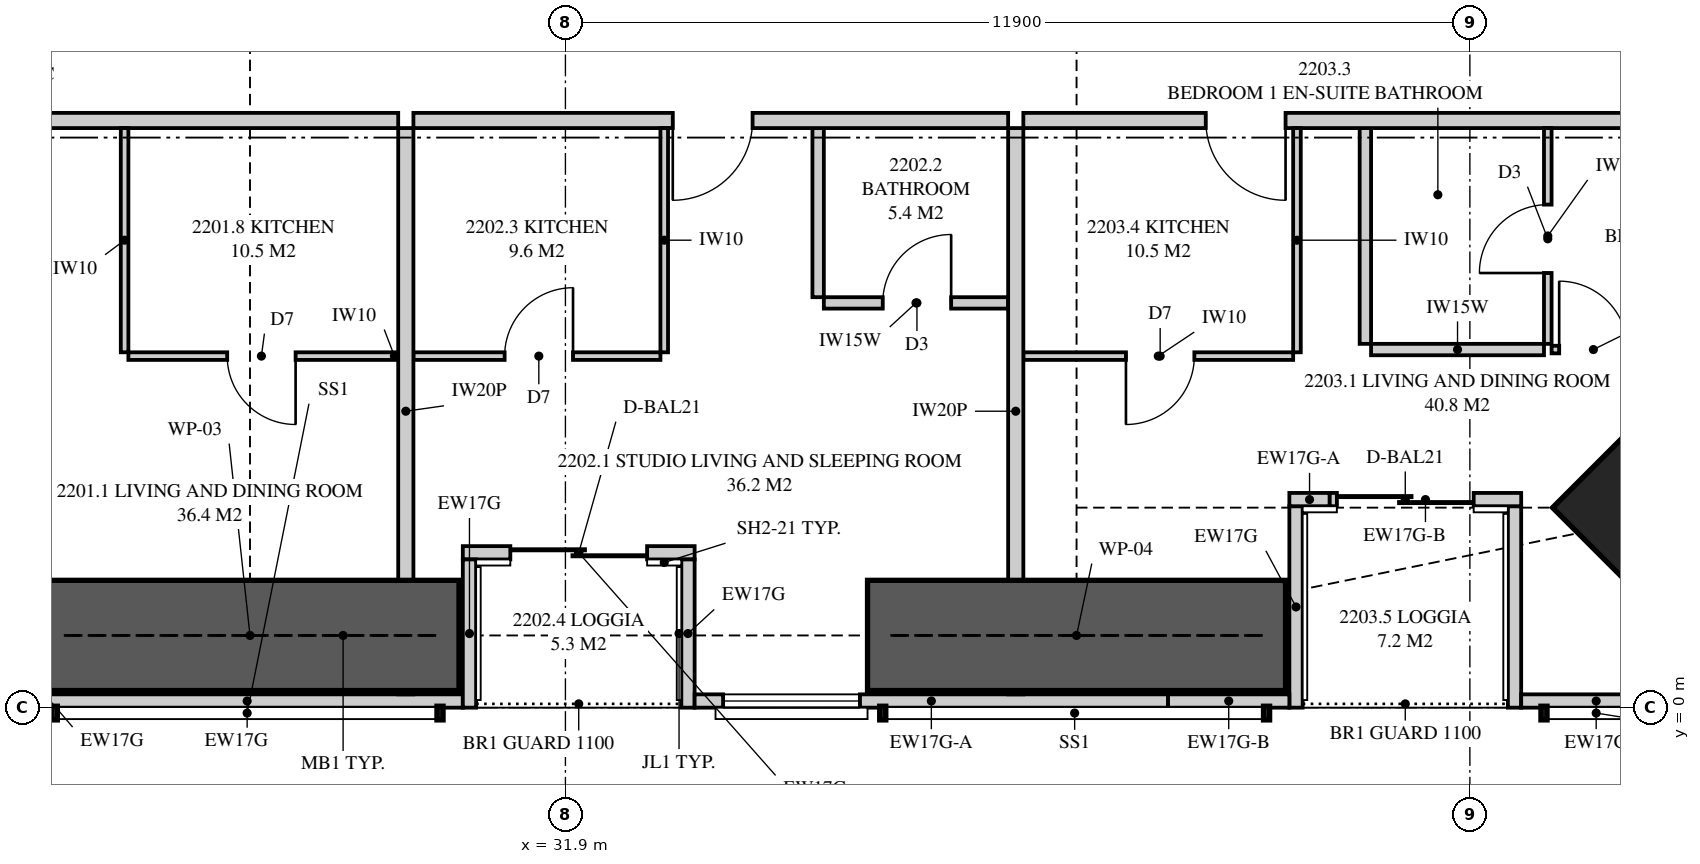
"""IFC4 building model, lengths in metres.
Left out: names, types, materials, properties, quantities, classifications, styles, units other than length and angle.
Written with IfcOpenShell. Run it as: python <this file> out.ifc"""

import sys

from ifc_helpers import new_model, si_unit, direction, frame, frame_2d, origin, origin_2d, place, context, subcontext, project, spatial, polyline, rectangle, hollow_rectangle, outline, extrude, element, fill, save


model = new_model("IFC4")
c1 = context("Model", 3, precision=1e-05, world=origin(), true_north=direction((0.0, 1.0)))
c2 = subcontext(c1, "Body", "Model", "MODEL_VIEW")
j1 = project(units=[si_unit("LENGTHUNIT", "METRE"), si_unit("PLANEANGLEUNIT", "RADIAN")], contexts=[c1])
p1 = place(None, origin())
s1 = spatial("IfcSite", under=j1, at=p1, CompositionType="ELEMENT")
p2 = place(p1, origin())
s2 = spatial("IfcBuilding", under=s1, at=p2, CompositionType="ELEMENT")
p3 = place(p2, frame((0.0, 0.0, 84.75)))
s3 = spatial("IfcBuildingStorey", under=s2, at=p3, CompositionType="ELEMENT", Elevation=84.75)
p4 = place(p3, frame((46.869, 2.631, 0.0), z_axis=(0.0, 0.0, 1.0), x_axis=(-0.707106781187, 0.707106781187, 0.0)))
e1 = element("IfcColumn", 1, at=p4, inside=s3, PredefinedType="COLUMN", context=c2, shape_type="SweptSolid", body=[
    extrude(hollow_rectangle(XDim=2.8, YDim=2.8, WallThickness=0.25, at=origin_2d()), origin(), (0.0, 0.0, 1.0), 3.35),
])
p5 = place(p3, frame((24.875, 0.087, 0.0), z_axis=(0.0, 0.0, 1.0), x_axis=(1.0, 0.0, 0.0)))
e2 = element("IfcWall", 2, at=p5, inside=s3, PredefinedType="SOLIDWALL", context=c2, shape_type="SweptSolid", body=[
    extrude(rectangle(XDim=5.675, YDim=0.175, at=frame_2d((2.837, 0.0))), origin(), (0.0, 0.0, 1.0), 2.15),
])
p6 = place(p3, frame((33.6, 0.087, 0.0), z_axis=(0.0, 0.0, 1.0), x_axis=(1.0, 0.0, 0.0)))
e3 = element("IfcWall", 3, at=p6, inside=s3, PredefinedType="SOLIDWALL", context=c2, shape_type="SweptSolid", body=[
    extrude(rectangle(XDim=6.229, YDim=0.175, at=frame_2d((3.115, 0.0))), origin(), (0.0, 0.0, 1.0), 2.15),
])
p7 = place(p6, frame((0.375, 0.0, 0.4)))
e4 = element("IfcOpeningElement", 4, at=p7, cuts=e3, PredefinedType="OPENING", context=c2, shape_type="SweptSolid", body=[
    extrude(rectangle(XDim=1.8, YDim=1.7, at=frame_2d((0.9, 0.85))), frame((0.0, 0.097, 0.0), z_axis=(0.0, -1.0, 0.0), x_axis=(1.0, 0.0, 0.0)), (0.0, 0.0, 1.0), 0.195),
])
p8 = place(p3, frame((39.829, 0.087, 0.0), z_axis=(0.0, 0.0, 1.0), x_axis=(1.0, 0.0, 0.0)))
e5 = element("IfcWall", 5, at=p8, inside=s3, PredefinedType="SOLIDWALL", context=c2, shape_type="SweptSolid", body=[
    extrude(rectangle(XDim=1.596, YDim=0.175, at=frame_2d((0.798, 0.0))), origin(), (0.0, 0.0, 1.0), 3.11),
])
p9 = place(p3, frame((44.475, 0.087, 0.0), z_axis=(0.0, 0.0, 1.0), x_axis=(1.0, 0.0, 0.0)))
e6 = element("IfcWall", 6, at=p9, inside=s3, PredefinedType="SOLIDWALL", context=c2, shape_type="SweptSolid", body=[
    extrude(rectangle(XDim=1.974, YDim=0.175, at=frame_2d((0.987, 0.0))), origin(), (0.0, 0.0, 1.0), 3.11),
])
p10 = place(p3, frame((30.55, 2.038, 0.0), z_axis=(0.0, 0.0, 1.0), x_axis=(1.0, 0.0, 0.0)))
e7 = element("IfcWall", 7, at=p10, inside=s3, PredefinedType="SOLIDWALL", context=c2, shape_type="SweptSolid", body=[
    extrude(rectangle(XDim=3.05, YDim=0.175, at=frame_2d((1.525, 0.0))), origin(), (0.0, 0.0, 1.0), 2.15),
])
p11 = place(p10, frame((0.625, 0.0, 0.0)))
e8 = element("IfcOpeningElement", 8, at=p11, cuts=e7, PredefinedType="OPENING", context=c2, shape_type="SweptSolid", body=[
    extrude(rectangle(XDim=1.8, YDim=2.1, at=frame_2d((0.9, 1.05))), frame((0.0, 0.097, 0.0), z_axis=(0.0, -1.0, 0.0), x_axis=(1.0, 0.0, 0.0)), (0.0, 0.0, 1.0), 0.195),
])
for number, where, z_axis, x_axis in (
    (9, (30.637, 0.0, 0.0), (0.0, 0.0, 1.0), (0.0, 1.0, 0.0)),
    (10, (33.512, 0.0, 0.0), (0.0, 0.0, 1.0), (0.0, 1.0, 0.0)),
):
    element("IfcWall", number, at=place(p3, frame(where, z_axis=z_axis, x_axis=x_axis)), inside=s3, PredefinedType="SOLIDWALL", context=c2, shape_type="SweptSolid", body=[
        extrude(rectangle(XDim=1.95, YDim=0.175, at=frame_2d((0.975, 0.0))), origin(), (0.0, 0.0, 1.0), 2.15),
    ])
p12 = place(p3, frame((41.425, 2.738, 0.0), z_axis=(0.0, 0.0, 1.0), x_axis=(1.0, 0.0, 0.0)))
e11 = element("IfcWall", 11, at=p12, inside=s3, PredefinedType="SOLIDWALL", context=c2, shape_type="SweptSolid", body=[
    extrude(rectangle(XDim=0.531, YDim=0.175, at=frame_2d((0.266, 0.0))), origin(), (0.0, 0.0, 1.0), 2.51),
])
p13 = place(p3, frame((41.956, 2.738, 0.0), z_axis=(0.0, 0.0, 1.0), x_axis=(1.0, 0.0, 0.0)))
e12 = element("IfcWall", 12, at=p13, inside=s3, PredefinedType="SOLIDWALL", context=c2, shape_type="SweptSolid", body=[
    extrude(rectangle(XDim=2.519, YDim=0.175, at=frame_2d((1.26, 0.0))), origin(), (0.0, 0.0, 1.0), 2.15),
])
p14 = place(p13, frame((0.094, 0.0, 0.0)))
e13 = element("IfcOpeningElement", 13, at=p14, cuts=e12, PredefinedType="OPENING", context=c2, shape_type="SweptSolid", body=[
    extrude(rectangle(XDim=1.8, YDim=2.1, at=frame_2d((0.9, 1.05))), frame((0.0, 0.097, 0.0), z_axis=(0.0, -1.0, 0.0), x_axis=(1.0, 0.0, 0.0)), (0.0, 0.0, 1.0), 0.195),
])
p15 = place(p3, frame((41.512, 0.0, 0.0), z_axis=(0.0, 0.0, 1.0), x_axis=(0.0, 1.0, 0.0)))
e14 = element("IfcWall", 14, at=p15, inside=s3, PredefinedType="SOLIDWALL", context=c2, shape_type="SweptSolid", body=[
    extrude(outline(polyline([(0.0, 0.0), (2.65, 0.0), (2.65, 2.51), (2.577, 2.51), (2.577, 2.15), (0.5, 2.15), (0.5, 3.11), (0.0, 3.11), (0.0, 0.0)])), frame((0.0, 0.087, 0.0), z_axis=(0.0, -1.0, 0.0), x_axis=(1.0, 0.0, 0.0)), (0.0, 0.0, 1.0), 0.175),
])
p16 = place(p3, frame((44.387, 0.0, 0.0), z_axis=(0.0, 0.0, 1.0), x_axis=(0.0, 1.0, 0.0)))
e15 = element("IfcWall", 15, at=p16, inside=s3, PredefinedType="SOLIDWALL", context=c2, shape_type="SweptSolid", body=[
    extrude(outline(polyline([(0.0, 0.0), (2.65, 0.0), (2.65, 2.15), (1.087, 2.15), (1.087, 3.11), (0.0, 3.11), (0.0, 0.0)])), frame((0.0, 0.087, 0.0), z_axis=(0.0, -1.0, 0.0), x_axis=(1.0, 0.0, 0.0)), (0.0, 0.0, 1.0), 0.175),
])
p17 = place(p3, frame((29.8, 0.175, 0.0), z_axis=(0.0, 0.0, 1.0), x_axis=(0.0, 1.0, 0.0)))
e16 = element("IfcWall", 16, at=p17, inside=s3, PredefinedType="PARTITIONING", context=c2, shape_type="SweptSolid", body=[
    extrude(outline(polyline([(0.0, 0.0), (7.45, 0.0), (7.45, 3.11), (1.885, 3.11), (1.885, 2.15), (1.021, 2.15), (1.021, 1.986), (0.529, 1.986), (0.529, 2.15), (0.0, 2.15), (0.0, 0.0)])), frame((0.0, 0.1, 0.0), z_axis=(0.0, -1.0, 0.0), x_axis=(1.0, 0.0, 0.0)), (0.0, 0.0, 1.0), 0.2),
])
p18 = place(p3, frame((26.15, 4.625, 0.0), z_axis=(0.0, 0.0, 1.0), x_axis=(1.0, 0.0, 0.0)))
e17 = element("IfcWall", 17, at=p18, inside=s3, PredefinedType="PARTITIONING", context=c2, shape_type="SweptSolid", body=[
    extrude(outline(polyline([(0.0, 0.0), (3.55, 0.0), (3.55, 3.11), (1.896, 3.11), (1.896, 2.531), (1.304, 2.531), (1.304, 3.11), (0.0, 3.11), (0.0, 0.0)])), frame((0.0, 0.05, 0.0), z_axis=(0.0, -1.0, 0.0), x_axis=(1.0, 0.0, 0.0)), (0.0, 0.0, 1.0), 0.1),
])
p19 = place(p18, frame((1.3, 0.0, 0.0)))
e18 = element("IfcOpeningElement", 18, at=p19, cuts=e17, PredefinedType="OPENING", context=c2, shape_type="SweptSolid", body=[
    extrude(rectangle(XDim=0.9, YDim=2.1, at=frame_2d((0.45, 1.05))), frame((0.0, 0.06, 0.0), z_axis=(0.0, -1.0, 0.0), x_axis=(1.0, 0.0, 0.0)), (0.0, 0.0, 1.0), 0.12),
])
p20 = place(p3, frame((26.1, 4.675, 0.0), z_axis=(0.0, 0.0, 1.0), x_axis=(0.0, 1.0, 0.0)))
e19 = element("IfcWall", 19, at=p20, inside=s3, PredefinedType="PARTITIONING", context=c2, shape_type="SweptSolid", body=[
    extrude(rectangle(XDim=2.95, YDim=0.1, at=frame_2d((1.475, 0.0))), origin(), (0.0, 0.0, 1.0), 3.11),
])
p21 = place(p3, frame((37.825, 0.175, 0.0), z_axis=(0.0, 0.0, 1.0), x_axis=(0.0, 1.0, 0.0)))
e20 = element("IfcWall", 20, at=p21, inside=s3, PredefinedType="PARTITIONING", context=c2, shape_type="SweptSolid", body=[
    extrude(outline(polyline([(1.885, 2.15), (0.0, 2.15), (0.0, 0.266), (0.529, 0.266), (0.529, 0.684), (1.021, 0.684), (1.021, 0.266), (1.535, 0.266), (1.535, 0.0), (7.45, 0.0), (7.45, 3.11), (1.885, 3.11), (1.885, 2.15)]), holes=[polyline([(0.529, 1.016), (0.529, 1.924), (1.021, 1.924), (1.021, 1.016), (0.529, 1.016)])]), frame((0.0, 0.1, 0.0), z_axis=(0.0, -1.0, 0.0), x_axis=(1.0, 0.0, 0.0)), (0.0, 0.0, 1.0), 0.2),
])
p22 = place(p3, frame((29.9, 7.725, 0.0), z_axis=(0.0, 0.0, 1.0), x_axis=(1.0, 0.0, 0.0)))
e21 = element("IfcWall", 21, at=p22, inside=s3, PredefinedType="PARTITIONING", context=c2, shape_type="SweptSolid", body=[
    extrude(rectangle(XDim=7.825, YDim=0.2, at=frame_2d((3.913, 0.0))), origin(), (0.0, 0.0, 1.0), 3.11),
])
p23 = place(p22, frame((3.413, 0.0, 0.0)))
e22 = element("IfcOpeningElement", 22, at=p23, cuts=e21, PredefinedType="OPENING", context=c2, shape_type="SweptSolid", body=[
    extrude(rectangle(XDim=1.05, YDim=2.2, at=frame_2d((0.525, 1.1))), frame((0.0, 0.11, 0.0), z_axis=(0.0, -1.0, 0.0), x_axis=(1.0, 0.0, 0.0)), (0.0, 0.0, 1.0), 0.22),
])
p24 = place(p3, frame((35.3, 5.325, 0.0), z_axis=(0.0, 0.0, 1.0), x_axis=(1.0, 0.0, 0.0)))
e23 = element("IfcWall", 23, at=p24, inside=s3, PredefinedType="PLUMBINGWALL", context=c2, shape_type="SweptSolid", body=[
    extrude(rectangle(XDim=2.425, YDim=0.15, at=frame_2d((1.212, 0.0))), origin(), (0.0, 0.0, 1.0), 3.11),
])
p25 = place(p24, frame((0.775, 0.0, 0.0)))
e24 = element("IfcOpeningElement", 24, at=p25, cuts=e23, PredefinedType="OPENING", context=c2, shape_type="SweptSolid", body=[
    extrude(rectangle(XDim=0.9, YDim=2.1, at=frame_2d((0.45, 1.05))), frame((0.0, 0.085, 0.0), z_axis=(0.0, -1.0, 0.0), x_axis=(1.0, 0.0, 0.0)), (0.0, 0.0, 1.0), 0.17),
])
p26 = place(p3, frame((35.225, 5.4, 0.0), z_axis=(0.0, 0.0, 1.0), x_axis=(0.0, 1.0, 0.0)))
e25 = element("IfcWall", 25, at=p26, inside=s3, PredefinedType="PLUMBINGWALL", context=c2, shape_type="SweptSolid", body=[
    extrude(rectangle(XDim=2.225, YDim=0.15, at=frame_2d((1.113, 0.0))), origin(), (0.0, 0.0, 1.0), 3.11),
])
p27 = place(p3, frame((29.9, 4.625, 0.0), z_axis=(0.0, 0.0, 1.0), x_axis=(1.0, 0.0, 0.0)))
e26 = element("IfcWall", 26, at=p27, inside=s3, PredefinedType="PARTITIONING", context=c2, shape_type="SweptSolid", body=[
    extrude(rectangle(XDim=3.25, YDim=0.1, at=frame_2d((1.625, 0.0))), origin(), (0.0, 0.0, 1.0), 3.11),
])
p28 = place(p27, frame((1.2, 0.0, 0.0)))
e27 = element("IfcOpeningElement", 27, at=p28, cuts=e26, PredefinedType="OPENING", context=c2, shape_type="SweptSolid", body=[
    extrude(rectangle(XDim=0.9, YDim=2.1, at=frame_2d((0.45, 1.05))), frame((0.0, 0.06, 0.0), z_axis=(0.0, -1.0, 0.0), x_axis=(1.0, 0.0, 0.0)), (0.0, 0.0, 1.0), 0.12),
])
p29 = place(p3, frame((33.2, 4.675, 0.0), z_axis=(0.0, 0.0, 1.0), x_axis=(0.0, 1.0, 0.0)))
e28 = element("IfcWall", 28, at=p29, inside=s3, PredefinedType="PARTITIONING", context=c2, shape_type="SweptSolid", body=[
    extrude(rectangle(XDim=2.95, YDim=0.1, at=frame_2d((1.475, 0.0))), origin(), (0.0, 0.0, 1.0), 3.11),
])
p30 = place(p3, frame((37.925, 7.725, 0.0), z_axis=(0.0, 0.0, 1.0), x_axis=(1.0, 0.0, 0.0)))
e29 = element("IfcWall", 29, at=p30, inside=s3, PredefinedType="PARTITIONING", context=c2, shape_type="SweptSolid", body=[
    extrude(outline(polyline([(0.0, 0.0), (8.1, 0.0), (8.1, 3.11), (1.046, 3.11), (1.046, 2.531), (0.354, 2.531), (0.354, 3.11), (0.0, 3.11), (0.0, 0.0)])), frame((0.0, 0.1, 0.0), z_axis=(0.0, -1.0, 0.0), x_axis=(1.0, 0.0, 0.0)), (0.0, 0.0, 1.0), 0.2),
])
p31 = place(p30, frame((2.4, 0.0, 0.0)))
e30 = element("IfcOpeningElement", 30, at=p31, cuts=e29, PredefinedType="OPENING", context=c2, shape_type="SweptSolid", body=[
    extrude(rectangle(XDim=1.05, YDim=2.2, at=frame_2d((0.525, 1.1))), frame((0.0, 0.11, 0.0), z_axis=(0.0, -1.0, 0.0), x_axis=(1.0, 0.0, 0.0)), (0.0, 0.0, 1.0), 0.22),
])
p32 = place(p3, frame((44.825, 4.786, 0.0), z_axis=(0.0, 0.0, 1.0), x_axis=(0.0, 1.0, 0.0)))
e31 = element("IfcWall", 31, at=p32, inside=s3, PredefinedType="PARTITIONING", context=c2, shape_type="SweptSolid", body=[
    extrude(rectangle(XDim=2.839, YDim=0.1, at=frame_2d((1.419, 0.0))), origin(), (0.0, 0.0, 1.0), 3.11),
])
p33 = place(p32, frame((0.932, 0.0, 0.0)))
e32 = element("IfcOpeningElement", 32, at=p33, cuts=e31, PredefinedType="OPENING", context=c2, shape_type="SweptSolid", body=[
    extrude(rectangle(XDim=0.9, YDim=2.1, at=frame_2d((0.45, 1.05))), frame((0.0, 0.06, 0.0), z_axis=(0.0, -1.0, 0.0), x_axis=(1.0, 0.0, 0.0)), (0.0, 0.0, 1.0), 0.12),
])
p34 = place(p3, frame((44.875, 4.711, 0.0), z_axis=(0.0, 0.0, 1.0), x_axis=(1.0, 0.0, 0.0)))
e33 = element("IfcWall", 33, at=p34, inside=s3, PredefinedType="PARTITIONING", context=c2, shape_type="SweptSolid", body=[
    extrude(outline(polyline([(0.0, 0.0), (4.625, 0.0), (4.625, 3.11), (3.405, 3.11), (3.405, 2.15), (1.257, 2.15), (1.257, 3.11), (0.0, 3.11), (0.0, 0.0)])), frame((0.0, 0.05, 0.0), z_axis=(0.0, -1.0, 0.0), x_axis=(1.0, 0.0, 0.0)), (0.0, 0.0, 1.0), 0.1),
])
p35 = place(p34, frame((0.1, 0.0, 0.0)))
e34 = element("IfcOpeningElement", 34, at=p35, cuts=e33, PredefinedType="OPENING", context=c2, shape_type="SweptSolid", body=[
    extrude(rectangle(XDim=0.9, YDim=2.1, at=frame_2d((0.45, 1.05))), frame((0.0, 0.06, 0.0), z_axis=(0.0, -1.0, 0.0), x_axis=(1.0, 0.0, 0.0)), (0.0, 0.0, 1.0), 0.12),
])
p36 = place(p3, frame((42.5, 4.711, 0.0), z_axis=(0.0, 0.0, 1.0), x_axis=(1.0, 0.0, 0.0)))
e35 = element("IfcWall", 35, at=p36, inside=s3, PredefinedType="PLUMBINGWALL", context=c2, shape_type="SweptSolid", body=[
    extrude(rectangle(XDim=2.275, YDim=0.15, at=frame_2d((1.137, 0.0))), origin(), (0.0, 0.0, 1.0), 3.11),
])
p37 = place(p3, frame((42.425, 4.786, 0.0), z_axis=(0.0, 0.0, 1.0), x_axis=(0.0, 1.0, 0.0)))
e36 = element("IfcWall", 36, at=p37, inside=s3, PredefinedType="PLUMBINGWALL", context=c2, shape_type="SweptSolid", body=[
    extrude(rectangle(XDim=2.839, YDim=0.15, at=frame_2d((1.419, 0.0))), origin(), (0.0, 0.0, 1.0), 3.11),
])
p38 = place(p3, frame((37.925, 4.625, 0.0), z_axis=(0.0, 0.0, 1.0), x_axis=(1.0, 0.0, 0.0)))
e37 = element("IfcWall", 37, at=p38, inside=s3, PredefinedType="PARTITIONING", context=c2, shape_type="SweptSolid", body=[
    extrude(outline(polyline([(0.0, 0.0), (3.55, 0.0), (3.55, 3.11), (0.996, 3.11), (0.996, 2.531), (0.404, 2.531), (0.404, 3.11), (0.0, 3.11), (0.0, 0.0)])), frame((0.0, 0.05, 0.0), z_axis=(0.0, -1.0, 0.0), x_axis=(1.0, 0.0, 0.0)), (0.0, 0.0, 1.0), 0.1),
])
p39 = place(p38, frame((1.35, 0.0, 0.0)))
e38 = element("IfcOpeningElement", 38, at=p39, cuts=e37, PredefinedType="OPENING", context=c2, shape_type="SweptSolid", body=[
    extrude(rectangle(XDim=0.9, YDim=2.1, at=frame_2d((0.45, 1.05))), frame((0.0, 0.06, 0.0), z_axis=(0.0, -1.0, 0.0), x_axis=(1.0, 0.0, 0.0)), (0.0, 0.0, 1.0), 0.12),
])
p40 = place(p3, frame((41.525, 4.675, 0.0), z_axis=(0.0, 0.0, 1.0), x_axis=(0.0, 1.0, 0.0)))
e39 = element("IfcWall", 39, at=p40, inside=s3, PredefinedType="PARTITIONING", context=c2, shape_type="SweptSolid", body=[
    extrude(rectangle(XDim=2.95, YDim=0.1, at=frame_2d((1.475, 0.0))), origin(), (0.0, 0.0, 1.0), 3.11),
])
p41 = place(p3, frame((24.9, 7.725, 0.0), z_axis=(0.0, 0.0, 1.0), x_axis=(1.0, 0.0, 0.0)))
e40 = element("IfcWall", 40, at=p41, inside=s3, PredefinedType="PARTITIONING", context=c2, shape_type="SweptSolid", body=[
    extrude(outline(polyline([(0.0, 0.0), (4.8, 0.0), (4.8, 3.11), (3.196, 3.11), (3.196, 2.531), (2.504, 2.531), (2.504, 3.11), (0.0, 3.11), (0.0, 0.0)])), frame((0.0, 0.1, 0.0), z_axis=(0.0, -1.0, 0.0), x_axis=(1.0, 0.0, 0.0)), (0.0, 0.0, 1.0), 0.2),
])
for number, where, z_axis, x_axis in (
    (41, (25.0, 0.95, 0.0), (0.0, 0.0, 1.0), (1.0, 0.0, 0.0)),
    (42, (35.875, 0.95, 0.0), (0.0, 0.0, 1.0), (1.0, 0.0, 0.0)),
):
    element("IfcWall", number, at=place(p3, frame(where, z_axis=z_axis, x_axis=x_axis)), inside=s3, PredefinedType="SHEAR", context=c2, shape_type="SweptSolid", body=[
        extrude(rectangle(XDim=5.5, YDim=1.45, at=frame_2d((2.75, 0.0))), origin(), (0.0, 0.0, 1.0), 3.35),
    ])
p42 = place(p11, origin())
e43 = element("IfcDoor", 43, at=p42, inside=s3, OperationType="SLIDING_TO_LEFT", PredefinedType="DOOR", context=c2, shape_type="SweptSolid", body=[
    extrude(rectangle(XDim=1.8, YDim=2.1, at=frame_2d((0.9, 1.05))), frame((0.0, 0.025, 0.0), z_axis=(0.0, -1.0, 0.0), x_axis=(1.0, 0.0, 0.0)), (0.0, 0.0, 1.0), 0.05),
])
fill(e8, e43)
p43 = place(p7, origin())
e44 = element("IfcWindow", 44, at=p43, inside=s3, PartitioningType="SINGLE_PANEL", PredefinedType="WINDOW", context=c2, shape_type="SweptSolid", body=[
    extrude(rectangle(XDim=1.8, YDim=1.7, at=frame_2d((0.9, 0.85))), frame((0.0, 0.03, 0.0), z_axis=(0.0, -1.0, 0.0), x_axis=(1.0, 0.0, 0.0)), (0.0, 0.0, 1.0), 0.06),
])
fill(e4, e44)
p44 = place(p14, origin())
e45 = element("IfcDoor", 45, at=p44, inside=s3, OperationType="SLIDING_TO_LEFT", PredefinedType="DOOR", context=c2, shape_type="SweptSolid", body=[
    extrude(rectangle(XDim=1.8, YDim=2.1, at=frame_2d((0.9, 1.05))), frame((0.0, 0.025, 0.0), z_axis=(0.0, -1.0, 0.0), x_axis=(1.0, 0.0, 0.0)), (0.0, 0.0, 1.0), 0.05),
])
fill(e13, e45)
p45 = place(p19, frame((0.9, 0.0, 0.0), z_axis=(0.0, 0.0, 1.0), x_axis=(-1.0, 0.0, 0.0)))
e46 = element("IfcDoor", 46, at=p45, inside=s3, OperationType="SINGLE_SWING_LEFT", PredefinedType="DOOR", context=c2, shape_type="SweptSolid", body=[
    extrude(rectangle(XDim=0.9, YDim=2.1, at=frame_2d((0.45, 1.05))), frame((0.0, 0.025, 0.0), z_axis=(0.0, -1.0, 0.0), x_axis=(1.0, 0.0, 0.0)), (0.0, 0.0, 1.0), 0.05),
])
fill(e18, e46)
p46 = place(p23, frame((1.05, 0.0, 0.0), z_axis=(0.0, 0.0, 1.0), x_axis=(-1.0, 0.0, 0.0)))
e47 = element("IfcDoor", 47, at=p46, inside=s3, OperationType="SINGLE_SWING_RIGHT", PredefinedType="DOOR", context=c2, shape_type="SweptSolid", body=[
    extrude(rectangle(XDim=1.05, YDim=2.2, at=frame_2d((0.525, 1.1))), frame((0.0, 0.025, 0.0), z_axis=(0.0, -1.0, 0.0), x_axis=(1.0, 0.0, 0.0)), (0.0, 0.0, 1.0), 0.05),
])
fill(e22, e47)
p47 = place(p25, origin())
e48 = element("IfcDoor", 48, at=p47, inside=s3, OperationType="SINGLE_SWING_RIGHT", PredefinedType="DOOR", context=c2, shape_type="SweptSolid", body=[
    extrude(rectangle(XDim=0.9, YDim=2.1, at=frame_2d((0.45, 1.05))), frame((0.0, 0.025, 0.0), z_axis=(0.0, -1.0, 0.0), x_axis=(1.0, 0.0, 0.0)), (0.0, 0.0, 1.0), 0.05),
])
fill(e24, e48)
p48 = place(p28, origin())
e49 = element("IfcDoor", 49, at=p48, inside=s3, OperationType="SINGLE_SWING_RIGHT", PredefinedType="DOOR", context=c2, shape_type="SweptSolid", body=[
    extrude(rectangle(XDim=0.9, YDim=2.1, at=frame_2d((0.45, 1.05))), frame((0.0, 0.025, 0.0), z_axis=(0.0, -1.0, 0.0), x_axis=(1.0, 0.0, 0.0)), (0.0, 0.0, 1.0), 0.05),
])
fill(e27, e49)
p49 = place(p31, frame((1.05, 0.0, 0.0), z_axis=(0.0, 0.0, 1.0), x_axis=(-1.0, 0.0, 0.0)))
e50 = element("IfcDoor", 50, at=p49, inside=s3, OperationType="SINGLE_SWING_LEFT", PredefinedType="DOOR", context=c2, shape_type="SweptSolid", body=[
    extrude(rectangle(XDim=1.05, YDim=2.2, at=frame_2d((0.525, 1.1))), frame((0.0, 0.025, 0.0), z_axis=(0.0, -1.0, 0.0), x_axis=(1.0, 0.0, 0.0)), (0.0, 0.0, 1.0), 0.05),
])
fill(e30, e50)
p50 = place(p35, origin())
e51 = element("IfcDoor", 51, at=p50, inside=s3, OperationType="SINGLE_SWING_LEFT", PredefinedType="DOOR", context=c2, shape_type="SweptSolid", body=[
    extrude(rectangle(XDim=0.9, YDim=2.1, at=frame_2d((0.45, 1.05))), frame((0.0, 0.025, 0.0), z_axis=(0.0, -1.0, 0.0), x_axis=(1.0, 0.0, 0.0)), (0.0, 0.0, 1.0), 0.05),
])
fill(e34, e51)
p51 = place(p33, origin())
e52 = element("IfcDoor", 52, at=p51, inside=s3, OperationType="SINGLE_SWING_LEFT", PredefinedType="DOOR", context=c2, shape_type="SweptSolid", body=[
    extrude(rectangle(XDim=0.9, YDim=2.1, at=frame_2d((0.45, 1.05))), frame((0.0, 0.025, 0.0), z_axis=(0.0, -1.0, 0.0), x_axis=(1.0, 0.0, 0.0)), (0.0, 0.0, 1.0), 0.05),
])
fill(e32, e52)
p52 = place(p39, frame((0.9, 0.0, 0.0), z_axis=(0.0, 0.0, 1.0), x_axis=(-1.0, 0.0, 0.0)))
e53 = element("IfcDoor", 53, at=p52, inside=s3, OperationType="SINGLE_SWING_RIGHT", PredefinedType="DOOR", context=c2, shape_type="SweptSolid", body=[
    extrude(rectangle(XDim=0.9, YDim=2.1, at=frame_2d((0.45, 1.05))), frame((0.0, 0.025, 0.0), z_axis=(0.0, -1.0, 0.0), x_axis=(1.0, 0.0, 0.0)), (0.0, 0.0, 1.0), 0.05),
])
fill(e38, e53)
save(model, sys.argv[1])
